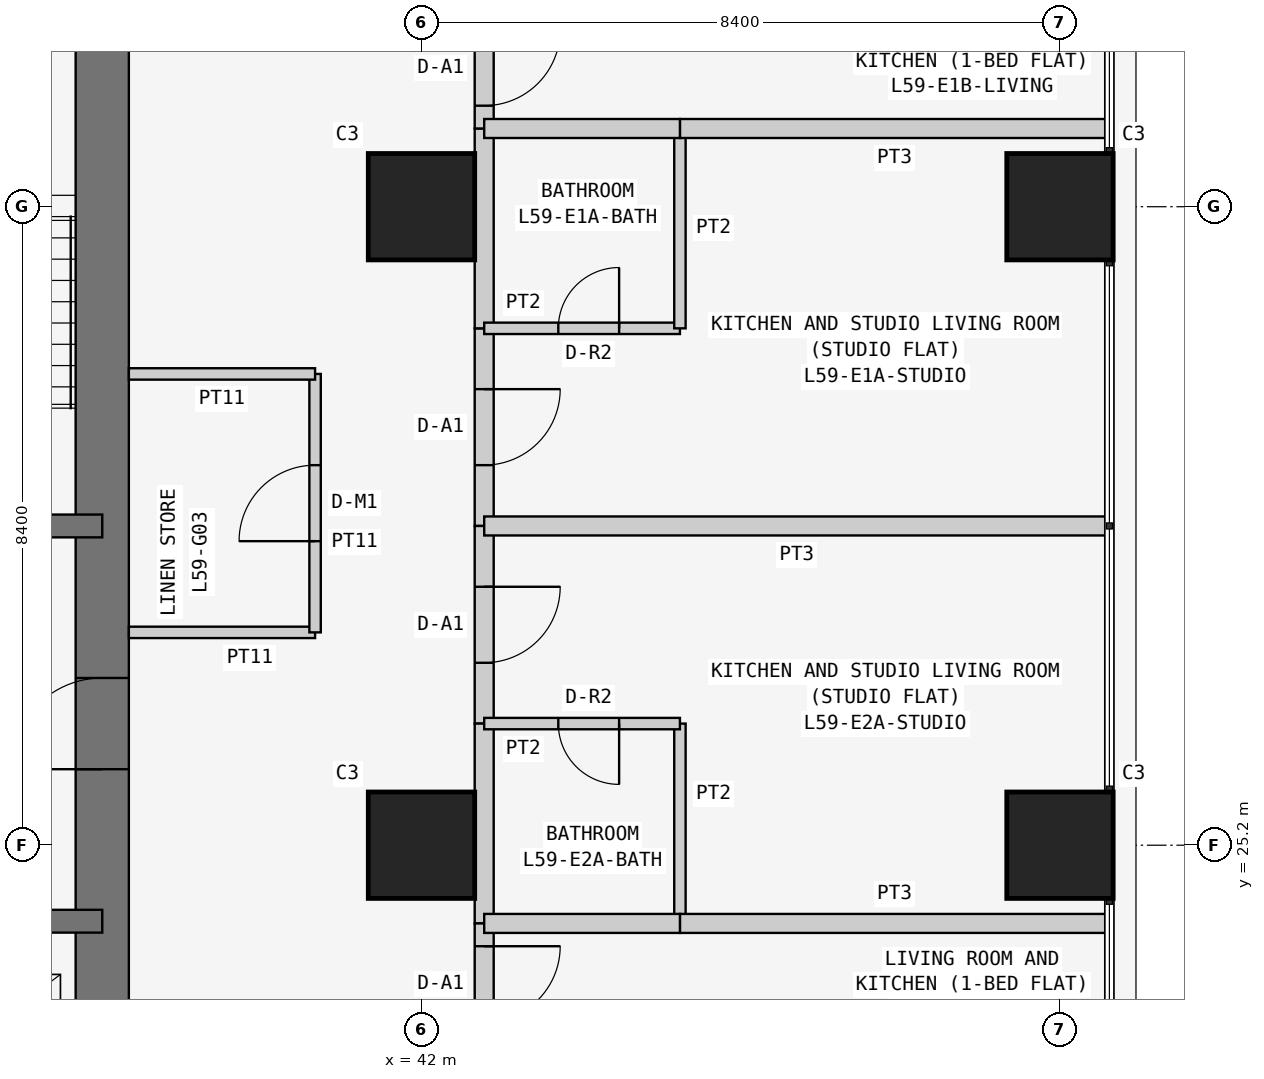
"""IFC4 building model, lengths in metres.
Left out: names, types, materials, properties, quantities, classifications, styles, units other than length and angle.
Written with IfcOpenShell. Run it as: python <this file> out.ifc"""

import sys

from ifc_helpers import new_model, si_unit, direction, frame, frame_2d, origin, origin_2d, place, context, subcontext, project, spatial, rectangle, extrude, element, fill, save


model = new_model("IFC4")
c1 = context("Model", 3, precision=1e-05, world=origin(), true_north=direction((0.0, 1.0)))
c2 = subcontext(c1, "Body", "Model", "MODEL_VIEW")
j1 = project(units=[si_unit("LENGTHUNIT", "METRE"), si_unit("PLANEANGLEUNIT", "RADIAN")], contexts=[c1])
p1 = place(None, origin())
s1 = spatial("IfcSite", under=j1, at=p1, CompositionType="ELEMENT")
p2 = place(p1, origin())
s2 = spatial("IfcBuilding", under=s1, at=p2, CompositionType="ELEMENT")
p3 = place(p2, frame((0.0, 0.0, 226.5)))
s3 = spatial("IfcBuildingStorey", under=s2, at=p3, CompositionType="ELEMENT", Elevation=226.5)
for number, where, z_axis, x_axis in (
    (1, (42.0, 25.2, 0.0), (0.0, 0.0, 1.0), (1.0, 0.0, 0.0)),
    (2, (42.0, 33.6, 0.0), (0.0, 0.0, 1.0), (1.0, 0.0, 0.0)),
    (3, (50.4, 25.2, 0.0), (0.0, 0.0, 1.0), (1.0, 0.0, 0.0)),
    (4, (50.4, 33.6, 0.0), (0.0, 0.0, 1.0), (1.0, 0.0, 0.0)),
):
    element("IfcColumn", number, at=place(p3, frame(where, z_axis=z_axis, x_axis=x_axis)), inside=s3, PredefinedType="COLUMN", context=c2, shape_type="SweptSolid", body=[
        extrude(rectangle(XDim=1.4, YDim=1.4, at=origin_2d()), origin(), (0.0, 0.0, 1.0), 3.6),
    ])
p4 = place(p3, frame((37.8, 21.0, 0.0), z_axis=(0.0, 0.0, 1.0), x_axis=(0.0, 1.0, 0.0)))
e5 = element("IfcWall", 5, at=p4, inside=s3, PredefinedType="SHEAR", context=c2, shape_type="SweptSolid", body=[
    extrude(rectangle(XDim=17.15, YDim=0.7, at=frame_2d((8.575, 0.0))), origin(), (0.0, 0.0, 1.0), 3.6),
])
p5 = place(p4, frame((5.2, 0.0, 0.0)))
e6 = element("IfcOpeningElement", 6, at=p5, cuts=e5, PredefinedType="OPENING", context=c2, shape_type="SweptSolid", body=[
    extrude(rectangle(XDim=1.2, YDim=2.1, at=frame_2d((0.6, 1.05))), frame((0.0, 0.36, 0.0), z_axis=(0.0, -1.0, 0.0), x_axis=(1.0, 0.0, 0.0)), (0.0, 0.0, 1.0), 0.72),
])
p6 = place(p3, frame((26.6, 24.2, 0.0), z_axis=(0.0, 0.0, 1.0), x_axis=(1.0, 0.0, 0.0)))
e7 = element("IfcWall", 7, at=p6, inside=s3, PredefinedType="SHEAR", context=c2, shape_type="SweptSolid", body=[
    extrude(rectangle(XDim=11.2, YDim=0.3, at=frame_2d((5.6, 0.0))), origin(), (0.0, 0.0, 1.0), 3.6),
])
p7 = place(p6, frame((0.913, 0.0, 0.0)))
e8 = element("IfcOpeningElement", 8, at=p7, cuts=e7, PredefinedType="OPENING", context=c2, shape_type="SweptSolid", body=[
    extrude(rectangle(XDim=1.0, YDim=2.1, at=frame_2d((0.5, 1.05))), frame((0.0, 0.16, 0.0), z_axis=(0.0, -1.0, 0.0), x_axis=(1.0, 0.0, 0.0)), (0.0, 0.0, 1.0), 0.32),
])
p8 = place(p6, frame((3.75, 0.0, 0.0)))
e9 = element("IfcOpeningElement", 9, at=p8, cuts=e7, PredefinedType="OPENING", context=c2, shape_type="SweptSolid", body=[
    extrude(rectangle(XDim=0.9, YDim=2.1, at=frame_2d((0.45, 1.05))), frame((0.0, 0.16, 0.0), z_axis=(0.0, -1.0, 0.0), x_axis=(1.0, 0.0, 0.0)), (0.0, 0.0, 1.0), 0.32),
])
p9 = place(p6, frame((6.45, 0.0, 0.0)))
e10 = element("IfcOpeningElement", 10, at=p9, cuts=e7, PredefinedType="OPENING", context=c2, shape_type="SweptSolid", body=[
    extrude(rectangle(XDim=1.1, YDim=2.1, at=frame_2d((0.55, 1.05))), frame((0.0, 0.16, 0.0), z_axis=(0.0, -1.0, 0.0), x_axis=(1.0, 0.0, 0.0)), (0.0, 0.0, 1.0), 0.32),
])
p10 = place(p6, frame((9.1, 0.0, 0.0)))
e11 = element("IfcOpeningElement", 11, at=p10, cuts=e7, PredefinedType="OPENING", context=c2, shape_type="SweptSolid", body=[
    extrude(rectangle(XDim=1.1, YDim=2.1, at=frame_2d((0.55, 1.05))), frame((0.0, 0.16, 0.0), z_axis=(0.0, -1.0, 0.0), x_axis=(1.0, 0.0, 0.0)), (0.0, 0.0, 1.0), 0.32),
])
p11 = place(p3, frame((32.2, 29.4, 0.0), z_axis=(0.0, 0.0, 1.0), x_axis=(1.0, 0.0, 0.0)))
e12 = element("IfcWall", 12, at=p11, inside=s3, PredefinedType="SHEAR", context=c2, shape_type="SweptSolid", body=[
    extrude(rectangle(XDim=5.6, YDim=0.3, at=frame_2d((2.8, 0.0))), origin(), (0.0, 0.0, 1.0), 3.6),
])
p12 = place(p11, frame((2.0, 0.0, 0.0)))
e13 = element("IfcOpeningElement", 13, at=p12, cuts=e12, PredefinedType="OPENING", context=c2, shape_type="SweptSolid", body=[
    extrude(rectangle(XDim=1.2, YDim=2.1, at=frame_2d((0.6, 1.05))), frame((0.0, 0.16, 0.0), z_axis=(0.0, -1.0, 0.0), x_axis=(1.0, 0.0, 0.0)), (0.0, 0.0, 1.0), 0.32),
])
p13 = place(p3, frame((38.15, 28.0, 0.0), z_axis=(0.0, 0.0, 1.0), x_axis=(1.0, 0.0, 0.0)))
e14 = element("IfcWall", 14, at=p13, inside=s3, PredefinedType="PARTITIONING", context=c2, shape_type="SweptSolid", body=[
    extrude(rectangle(XDim=2.45, YDim=0.15, at=frame_2d((1.225, 0.0))), origin(), (0.0, 0.0, 1.0), 3.45),
])
p14 = place(p3, frame((40.6, 28.0, 0.0), z_axis=(0.0, 0.0, 1.0), x_axis=(0.0, 1.0, 0.0)))
e15 = element("IfcWall", 15, at=p14, inside=s3, PredefinedType="PARTITIONING", context=c2, shape_type="SweptSolid", body=[
    extrude(rectangle(XDim=3.4, YDim=0.15, at=frame_2d((1.7, 0.0))), origin(), (0.0, 0.0, 1.0), 3.45),
])
p15 = place(p14, frame((1.2, 0.0, 0.0)))
e16 = element("IfcOpeningElement", 16, at=p15, cuts=e15, PredefinedType="OPENING", context=c2, shape_type="SweptSolid", body=[
    extrude(rectangle(XDim=1.0, YDim=2.1, at=frame_2d((0.5, 1.05))), frame((0.0, 0.085, 0.0), z_axis=(0.0, -1.0, 0.0), x_axis=(1.0, 0.0, 0.0)), (0.0, 0.0, 1.0), 0.17),
])
p16 = place(p3, frame((40.6, 31.4, 0.0), z_axis=(0.0, 0.0, 1.0), x_axis=(-1.0, 0.0, 0.0)))
e17 = element("IfcWall", 17, at=p16, inside=s3, PredefinedType="PARTITIONING", context=c2, shape_type="SweptSolid", body=[
    extrude(rectangle(XDim=2.45, YDim=0.15, at=frame_2d((1.225, 0.0))), origin(), (0.0, 0.0, 1.0), 3.45),
])
p17 = place(p3, frame((42.825, 32.0, 0.0), z_axis=(0.0, 0.0, 1.0), x_axis=(0.0, -1.0, 0.0)))
e18 = element("IfcWall", 18, at=p17, inside=s3, PredefinedType="PARTITIONING", context=c2, shape_type="SweptSolid", body=[
    extrude(rectangle(XDim=2.6, YDim=0.25, at=frame_2d((1.3, 0.0))), origin(), (0.0, 0.0, 1.0), 3.45),
])
p18 = place(p17, frame((0.8, 0.0, 0.0)))
e19 = element("IfcOpeningElement", 19, at=p18, cuts=e18, PredefinedType="OPENING", context=c2, shape_type="SweptSolid", body=[
    extrude(rectangle(XDim=1.0, YDim=2.1, at=frame_2d((0.5, 1.05))), frame((0.0, 0.135, 0.0), z_axis=(0.0, -1.0, 0.0), x_axis=(1.0, 0.0, 0.0)), (0.0, 0.0, 1.0), 0.27),
])
p19 = place(p3, frame((42.825, 34.629, 0.0), z_axis=(0.0, 0.0, 1.0), x_axis=(0.0, -1.0, 0.0)))
e20 = element("IfcWall", 20, at=p19, inside=s3, PredefinedType="PARTITIONING", context=c2, shape_type="SweptSolid", body=[
    extrude(rectangle(XDim=2.629, YDim=0.25, at=frame_2d((1.314, 0.0))), origin(), (0.0, 0.0, 1.0), 3.45),
])
p20 = place(p3, frame((42.825, 36.229, 0.0), z_axis=(0.0, 0.0, 1.0), x_axis=(0.0, -1.0, 0.0)))
e21 = element("IfcWall", 21, at=p20, inside=s3, PredefinedType="PARTITIONING", context=c2, shape_type="SweptSolid", body=[
    extrude(rectangle(XDim=1.6, YDim=0.25, at=frame_2d((0.8, 0.0))), origin(), (0.0, 0.0, 1.0), 3.45),
])
p21 = place(p20, frame((0.3, 0.0, 0.0)))
e22 = element("IfcOpeningElement", 22, at=p21, cuts=e21, PredefinedType="OPENING", context=c2, shape_type="SweptSolid", body=[
    extrude(rectangle(XDim=1.0, YDim=2.1, at=frame_2d((0.5, 1.05))), frame((0.0, 0.135, 0.0), z_axis=(0.0, -1.0, 0.0), x_axis=(1.0, 0.0, 0.0)), (0.0, 0.0, 1.0), 0.27),
])
p22 = place(p3, frame((42.825, 29.4, 0.0), z_axis=(0.0, 0.0, 1.0), x_axis=(0.0, -1.0, 0.0)))
e23 = element("IfcWall", 23, at=p22, inside=s3, PredefinedType="PARTITIONING", context=c2, shape_type="SweptSolid", body=[
    extrude(rectangle(XDim=2.6, YDim=0.25, at=frame_2d((1.3, 0.0))), origin(), (0.0, 0.0, 1.0), 3.45),
])
p23 = place(p22, frame((0.8, 0.0, 0.0)))
e24 = element("IfcOpeningElement", 24, at=p23, cuts=e23, PredefinedType="OPENING", context=c2, shape_type="SweptSolid", body=[
    extrude(rectangle(XDim=1.0, YDim=2.1, at=frame_2d((0.5, 1.05))), frame((0.0, 0.135, 0.0), z_axis=(0.0, -1.0, 0.0), x_axis=(1.0, 0.0, 0.0)), (0.0, 0.0, 1.0), 0.27),
])
p24 = place(p3, frame((42.825, 26.8, 0.0), z_axis=(0.0, 0.0, 1.0), x_axis=(0.0, -1.0, 0.0)))
e25 = element("IfcWall", 25, at=p24, inside=s3, PredefinedType="PARTITIONING", context=c2, shape_type="SweptSolid", body=[
    extrude(rectangle(XDim=2.629, YDim=0.25, at=frame_2d((1.314, 0.0))), origin(), (0.0, 0.0, 1.0), 3.45),
])
p25 = place(p3, frame((42.825, 24.171, 0.0), z_axis=(0.0, 0.0, 1.0), x_axis=(0.0, -1.0, 0.0)))
e26 = element("IfcWall", 26, at=p25, inside=s3, PredefinedType="PARTITIONING", context=c2, shape_type="SweptSolid", body=[
    extrude(rectangle(XDim=1.6, YDim=0.25, at=frame_2d((0.8, 0.0))), origin(), (0.0, 0.0, 1.0), 3.45),
])
p26 = place(p25, frame((0.3, 0.0, 0.0)))
e27 = element("IfcOpeningElement", 27, at=p26, cuts=e26, PredefinedType="OPENING", context=c2, shape_type="SweptSolid", body=[
    extrude(rectangle(XDim=1.0, YDim=2.1, at=frame_2d((0.5, 1.05))), frame((0.0, 0.135, 0.0), z_axis=(0.0, -1.0, 0.0), x_axis=(1.0, 0.0, 0.0)), (0.0, 0.0, 1.0), 0.27),
])
p27 = place(p3, frame((42.825, 32.0, 0.0), z_axis=(0.0, 0.0, 1.0), x_axis=(1.0, 0.0, 0.0)))
e28 = element("IfcWall", 28, at=p27, inside=s3, PredefinedType="PARTITIONING", context=c2, shape_type="SweptSolid", body=[
    extrude(rectangle(XDim=2.575, YDim=0.15, at=frame_2d((1.288, 0.0))), origin(), (0.0, 0.0, 1.0), 3.45),
])
p28 = place(p27, frame((0.975, 0.0, 0.0)))
e29 = element("IfcOpeningElement", 29, at=p28, cuts=e28, PredefinedType="OPENING", context=c2, shape_type="SweptSolid", body=[
    extrude(rectangle(XDim=0.8, YDim=2.1, at=frame_2d((0.4, 1.05))), frame((0.0, 0.085, 0.0), z_axis=(0.0, -1.0, 0.0), x_axis=(1.0, 0.0, 0.0)), (0.0, 0.0, 1.0), 0.17),
])
p29 = place(p3, frame((45.4, 32.0, 0.0), z_axis=(0.0, 0.0, 1.0), x_axis=(0.0, 1.0, 0.0)))
e30 = element("IfcWall", 30, at=p29, inside=s3, PredefinedType="PARTITIONING", context=c2, shape_type="SweptSolid", body=[
    extrude(rectangle(XDim=2.629, YDim=0.15, at=frame_2d((1.314, 0.0))), origin(), (0.0, 0.0, 1.0), 3.45),
])
p30 = place(p3, frame((45.4, 34.629, 0.0), z_axis=(0.0, 0.0, 1.0), x_axis=(1.0, 0.0, 0.0)))
e31 = element("IfcWall", 31, at=p30, inside=s3, PredefinedType="PARTITIONING", context=c2, shape_type="SweptSolid", body=[
    extrude(rectangle(XDim=5.65, YDim=0.25, at=frame_2d((2.825, 0.0))), origin(), (0.0, 0.0, 1.0), 3.45),
])
p31 = place(p3, frame((51.05, 29.4, 0.0), z_axis=(0.0, 0.0, 1.0), x_axis=(-1.0, 0.0, 0.0)))
e32 = element("IfcWall", 32, at=p31, inside=s3, PredefinedType="PARTITIONING", context=c2, shape_type="SweptSolid", body=[
    extrude(rectangle(XDim=8.225, YDim=0.25, at=frame_2d((4.113, 0.0))), origin(), (0.0, 0.0, 1.0), 3.45),
])
p32 = place(p3, frame((45.4, 34.629, 0.0), z_axis=(0.0, 0.0, 1.0), x_axis=(-1.0, 0.0, 0.0)))
e33 = element("IfcWall", 33, at=p32, inside=s3, PredefinedType="PARTITIONING", context=c2, shape_type="SweptSolid", body=[
    extrude(rectangle(XDim=2.575, YDim=0.25, at=frame_2d((1.288, 0.0))), origin(), (0.0, 0.0, 1.0), 3.45),
])
p33 = place(p3, frame((45.4, 24.171, 0.0), z_axis=(0.0, 0.0, 1.0), x_axis=(0.0, 1.0, 0.0)))
e34 = element("IfcWall", 34, at=p33, inside=s3, PredefinedType="PARTITIONING", context=c2, shape_type="SweptSolid", body=[
    extrude(rectangle(XDim=2.629, YDim=0.15, at=frame_2d((1.314, 0.0))), origin(), (0.0, 0.0, 1.0), 3.45),
])
p34 = place(p3, frame((45.4, 26.8, 0.0), z_axis=(0.0, 0.0, 1.0), x_axis=(-1.0, 0.0, 0.0)))
e35 = element("IfcWall", 35, at=p34, inside=s3, PredefinedType="PARTITIONING", context=c2, shape_type="SweptSolid", body=[
    extrude(rectangle(XDim=2.575, YDim=0.15, at=frame_2d((1.288, 0.0))), origin(), (0.0, 0.0, 1.0), 3.45),
])
p35 = place(p34, frame((0.8, 0.0, 0.0)))
e36 = element("IfcOpeningElement", 36, at=p35, cuts=e35, PredefinedType="OPENING", context=c2, shape_type="SweptSolid", body=[
    extrude(rectangle(XDim=0.8, YDim=2.1, at=frame_2d((0.4, 1.05))), frame((0.0, 0.085, 0.0), z_axis=(0.0, -1.0, 0.0), x_axis=(1.0, 0.0, 0.0)), (0.0, 0.0, 1.0), 0.17),
])
p36 = place(p3, frame((51.05, 24.171, 0.0), z_axis=(0.0, 0.0, 1.0), x_axis=(-1.0, 0.0, 0.0)))
e37 = element("IfcWall", 37, at=p36, inside=s3, PredefinedType="PARTITIONING", context=c2, shape_type="SweptSolid", body=[
    extrude(rectangle(XDim=5.65, YDim=0.25, at=frame_2d((2.825, 0.0))), origin(), (0.0, 0.0, 1.0), 3.45),
])
p37 = place(p3, frame((45.4, 24.171, 0.0), z_axis=(0.0, 0.0, 1.0), x_axis=(-1.0, 0.0, 0.0)))
e38 = element("IfcWall", 38, at=p37, inside=s3, PredefinedType="PARTITIONING", context=c2, shape_type="SweptSolid", body=[
    extrude(rectangle(XDim=2.575, YDim=0.25, at=frame_2d((1.288, 0.0))), origin(), (0.0, 0.0, 1.0), 3.45),
])
p38 = place(p15, origin())
e39 = element("IfcDoor", 39, at=p38, inside=s3, OperationType="SINGLE_SWING_LEFT", PredefinedType="DOOR", context=c2, shape_type="SweptSolid", body=[
    extrude(rectangle(XDim=1.0, YDim=2.1, at=frame_2d((0.5, 1.05))), frame((0.0, 0.025, 0.0), z_axis=(0.0, -1.0, 0.0), x_axis=(1.0, 0.0, 0.0)), (0.0, 0.0, 1.0), 0.05),
])
fill(e16, e39)
p39 = place(p18, origin())
e40 = element("IfcDoor", 40, at=p39, inside=s3, OperationType="SINGLE_SWING_LEFT", PredefinedType="DOOR", context=c2, shape_type="SweptSolid", body=[
    extrude(rectangle(XDim=1.0, YDim=2.1, at=frame_2d((0.5, 1.05))), frame((0.0, 0.025, 0.0), z_axis=(0.0, -1.0, 0.0), x_axis=(1.0, 0.0, 0.0)), (0.0, 0.0, 1.0), 0.05),
])
fill(e19, e40)
p40 = place(p28, origin())
e41 = element("IfcDoor", 41, at=p40, inside=s3, OperationType="SINGLE_SWING_RIGHT", PredefinedType="DOOR", context=c2, shape_type="SweptSolid", body=[
    extrude(rectangle(XDim=0.8, YDim=2.1, at=frame_2d((0.4, 1.05))), frame((0.0, 0.025, 0.0), z_axis=(0.0, -1.0, 0.0), x_axis=(1.0, 0.0, 0.0)), (0.0, 0.0, 1.0), 0.05),
])
fill(e29, e41)
p41 = place(p21, origin())
e42 = element("IfcDoor", 42, at=p41, inside=s3, OperationType="SINGLE_SWING_LEFT", PredefinedType="DOOR", context=c2, shape_type="SweptSolid", body=[
    extrude(rectangle(XDim=1.0, YDim=2.1, at=frame_2d((0.5, 1.05))), frame((0.0, 0.025, 0.0), z_axis=(0.0, -1.0, 0.0), x_axis=(1.0, 0.0, 0.0)), (0.0, 0.0, 1.0), 0.05),
])
fill(e22, e42)
p42 = place(p23, origin())
e43 = element("IfcDoor", 43, at=p42, inside=s3, OperationType="SINGLE_SWING_LEFT", PredefinedType="DOOR", context=c2, shape_type="SweptSolid", body=[
    extrude(rectangle(XDim=1.0, YDim=2.1, at=frame_2d((0.5, 1.05))), frame((0.0, 0.025, 0.0), z_axis=(0.0, -1.0, 0.0), x_axis=(1.0, 0.0, 0.0)), (0.0, 0.0, 1.0), 0.05),
])
fill(e24, e43)
p43 = place(p35, origin())
e44 = element("IfcDoor", 44, at=p43, inside=s3, OperationType="SINGLE_SWING_LEFT", PredefinedType="DOOR", context=c2, shape_type="SweptSolid", body=[
    extrude(rectangle(XDim=0.8, YDim=2.1, at=frame_2d((0.4, 1.05))), frame((0.0, 0.025, 0.0), z_axis=(0.0, -1.0, 0.0), x_axis=(1.0, 0.0, 0.0)), (0.0, 0.0, 1.0), 0.05),
])
fill(e36, e44)
p44 = place(p26, origin())
e45 = element("IfcDoor", 45, at=p44, inside=s3, OperationType="SINGLE_SWING_LEFT", PredefinedType="DOOR", context=c2, shape_type="SweptSolid", body=[
    extrude(rectangle(XDim=1.0, YDim=2.1, at=frame_2d((0.5, 1.05))), frame((0.0, 0.025, 0.0), z_axis=(0.0, -1.0, 0.0), x_axis=(1.0, 0.0, 0.0)), (0.0, 0.0, 1.0), 0.05),
])
fill(e27, e45)
p45 = place(p5, origin())
e46 = element("IfcDoor", 46, at=p45, inside=s3, OperationType="SINGLE_SWING_LEFT", PredefinedType="DOOR", context=c2, shape_type="SweptSolid", body=[
    extrude(rectangle(XDim=1.2, YDim=2.1, at=frame_2d((0.6, 1.05))), frame((0.0, 0.025, 0.0), z_axis=(0.0, -1.0, 0.0), x_axis=(1.0, 0.0, 0.0)), (0.0, 0.0, 1.0), 0.05),
])
fill(e6, e46)
save(model, sys.argv[1])
